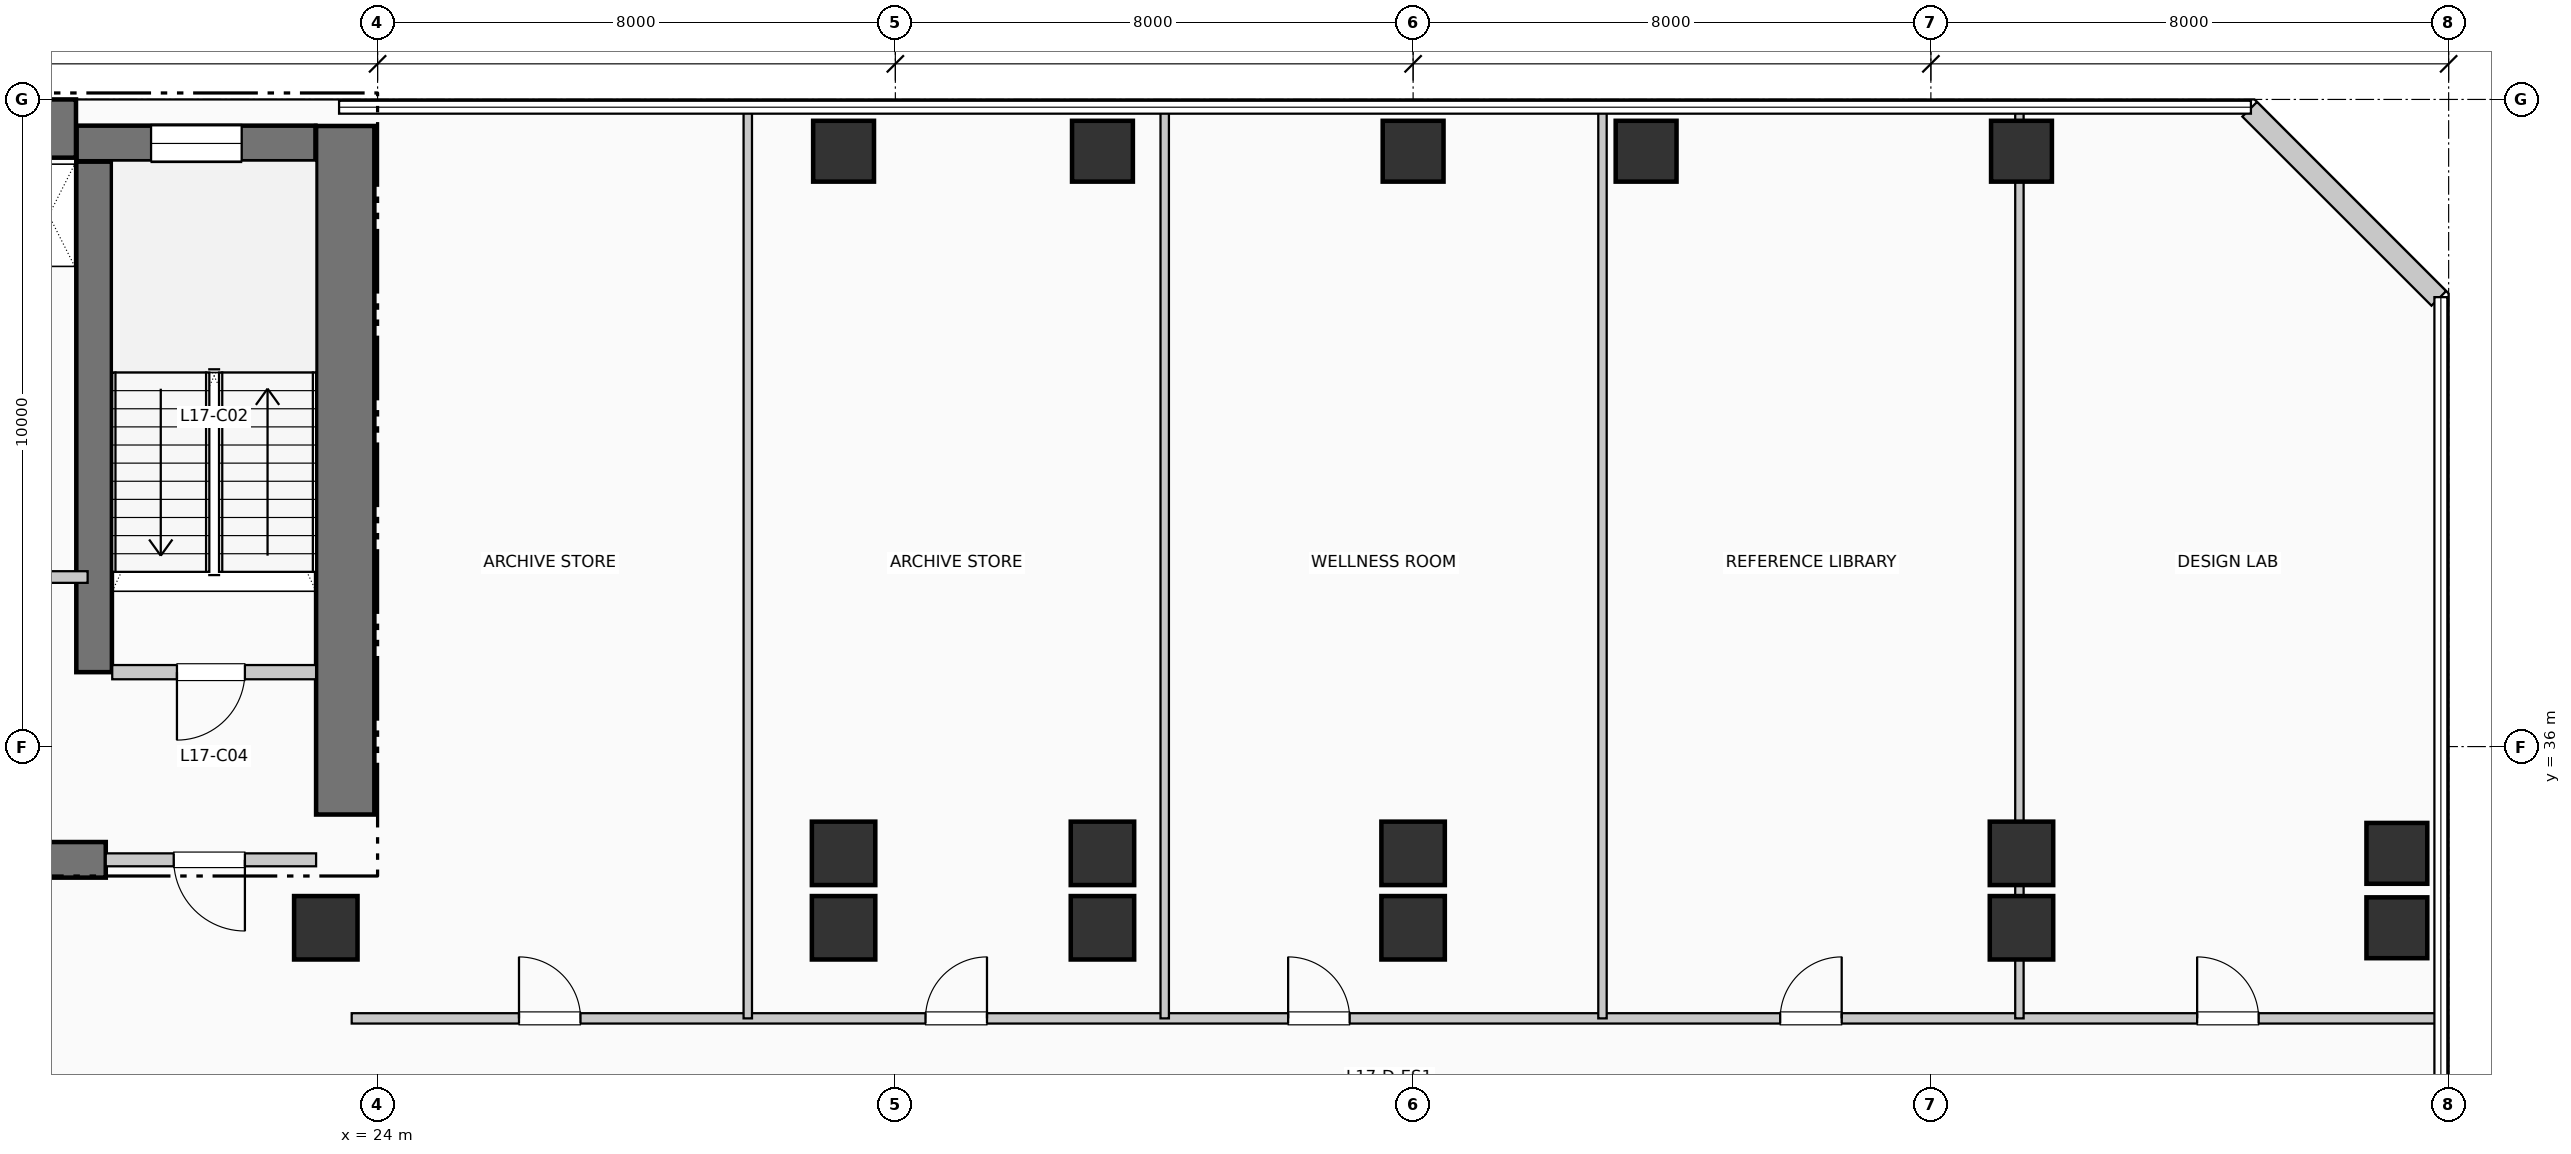
"""IFC4 building model, lengths in metres.
Left out: names, types, materials, properties, quantities, classifications, styles, units other than length and angle.
Written with IfcOpenShell. Run it as: python <this file> out.ifc"""

import sys

from ifc_helpers import new_model, si_unit, direction, frame, frame_2d, origin, origin_2d, place, context, subcontext, project, spatial, rectangle, extrude, element, fill, save


model = new_model("IFC4")
c1 = context("Model", 3, precision=1e-05, world=origin(), true_north=direction((0.0, 1.0)))
c2 = subcontext(c1, "Body", "Model", "MODEL_VIEW")
j1 = project(units=[si_unit("LENGTHUNIT", "METRE"), si_unit("PLANEANGLEUNIT", "RADIAN")], contexts=[c1])
p1 = place(None, origin())
s1 = spatial("IfcSite", under=j1, at=p1, CompositionType="ELEMENT")
p2 = place(p1, origin())
s2 = spatial("IfcBuilding", under=s1, at=p2, CompositionType="ELEMENT")
p3 = place(p2, frame((0.0, 0.0, 73.92)))
s3 = spatial("IfcBuildingStorey", under=s2, at=p3, CompositionType="ELEMENT", Elevation=73.92)
p4 = place(p3, frame((5.36, 45.55, 0.0), z_axis=(0.0, 0.0, 1.0), x_axis=(1.0, 0.0, 0.0)))
e1 = element("IfcWall", 1, at=p4, inside=s3, PredefinedType="SHEAR", context=c2, shape_type="SweptSolid", body=[
    extrude(rectangle(XDim=13.98, YDim=0.9, at=frame_2d((6.99, 0.0))), origin(), (0.0, 0.0, 1.0), 3.96),
])
p5 = place(p3, frame((23.5, 34.95, 0.0), z_axis=(0.0, 0.0, 1.0), x_axis=(0.0, 1.0, 0.0)))
e2 = element("IfcWall", 2, at=p5, inside=s3, PredefinedType="SHEAR", context=c2, shape_type="SweptSolid", body=[
    extrude(rectangle(XDim=10.64, YDim=0.9, at=frame_2d((5.32, 0.0))), origin(), (0.0, 0.0, 1.0), 3.96),
])
p6 = place(p3, frame((13.68, 34.25, 0.0), z_axis=(0.0, 0.0, 1.0), x_axis=(1.0, 0.0, 0.0)))
e3 = element("IfcWall", 3, at=p6, inside=s3, PredefinedType="SHEAR", context=c2, shape_type="SweptSolid", body=[
    extrude(rectangle(XDim=6.12, YDim=0.55, at=frame_2d((3.06, 0.0))), origin(), (0.0, 0.0, 1.0), 3.96),
])
p7 = place(p3, frame((19.62, 37.15, 0.0), z_axis=(0.0, 0.0, 1.0), x_axis=(0.0, 1.0, 0.0)))
e4 = element("IfcWall", 4, at=p7, inside=s3, PredefinedType="SHEAR", context=c2, shape_type="SweptSolid", body=[
    extrude(rectangle(XDim=7.89, YDim=0.55, at=frame_2d((3.945, 0.0))), origin(), (0.0, 0.0, 1.0), 3.96),
])
p8 = place(p3, frame((19.35, 45.32, 0.0), z_axis=(0.0, 0.0, 1.0), x_axis=(1.0, 0.0, 0.0)))
e5 = element("IfcWall", 5, at=p8, inside=s3, PredefinedType="SHEAR", context=c2, shape_type="SweptSolid", body=[
    extrude(rectangle(XDim=3.69, YDim=0.55, at=frame_2d((1.845, 0.0))), origin(), (0.0, 0.0, 1.0), 3.96),
])
p9 = place(p8, frame((1.15, 0.0, 1.05)))
e6 = element("IfcOpeningElement", 6, at=p9, cuts=e5, PredefinedType="OPENING", context=c2, shape_type="SweptSolid", body=[
    extrude(rectangle(XDim=1.4, YDim=1.8, at=frame_2d((0.7, 0.9))), frame((0.0, 0.285, 0.0), z_axis=(0.0, -1.0, 0.0), x_axis=(1.0, 0.0, 0.0)), (0.0, 0.0, 1.0), 0.57),
])
for number, where, z_axis, x_axis in (
    (7, (23.2, 33.2, 0.0), (0.0, 0.0, 1.0), (1.0, 0.0, 0.0)),
    (8, (31.2, 33.2, 0.0), (0.0, 0.0, 1.0), (1.0, 0.0, 0.0)),
    (9, (31.2, 34.35, 0.0), (0.0, 0.0, 1.0), (1.0, 0.0, 0.0)),
):
    element("IfcColumn", number, at=place(p3, frame(where, z_axis=z_axis, x_axis=x_axis)), inside=s3, PredefinedType="COLUMN", context=c2, shape_type="SweptSolid", body=[
        extrude(rectangle(XDim=0.98, YDim=0.98, at=origin_2d()), origin(), (0.0, 0.0, 1.0), 3.96),
    ])
p10 = place(p3, frame((31.2, 45.2, 0.0), z_axis=(0.0, 0.0, 1.0), x_axis=(1.0, 0.0, 0.0)))
e10 = element("IfcColumn", 10, at=p10, inside=s3, PredefinedType="COLUMN", context=c2, shape_type="SweptSolid", body=[
    extrude(rectangle(XDim=0.94, YDim=0.94, at=origin_2d()), origin(), (0.0, 0.0, 1.0), 3.96),
])
for number, where, z_axis, x_axis in (
    (11, (35.2, 33.2, 0.0), (0.0, 0.0, 1.0), (1.0, 0.0, 0.0)),
    (12, (35.2, 34.35, 0.0), (0.0, 0.0, 1.0), (1.0, 0.0, 0.0)),
):
    element("IfcColumn", number, at=place(p3, frame(where, z_axis=z_axis, x_axis=x_axis)), inside=s3, PredefinedType="COLUMN", context=c2, shape_type="SweptSolid", body=[
        extrude(rectangle(XDim=0.98, YDim=0.98, at=origin_2d()), origin(), (0.0, 0.0, 1.0), 3.96),
    ])
p11 = place(p3, frame((35.2, 45.2, 0.0), z_axis=(0.0, 0.0, 1.0), x_axis=(1.0, 0.0, 0.0)))
e13 = element("IfcColumn", 13, at=p11, inside=s3, PredefinedType="COLUMN", context=c2, shape_type="SweptSolid", body=[
    extrude(rectangle(XDim=0.94, YDim=0.94, at=origin_2d()), origin(), (0.0, 0.0, 1.0), 3.96),
])
for number, where, z_axis, x_axis in (
    (14, (40.0, 33.2, 0.0), (0.0, 0.0, 1.0), (1.0, 0.0, 0.0)),
    (15, (40.0, 34.35, 0.0), (0.0, 0.0, 1.0), (1.0, 0.0, 0.0)),
):
    element("IfcColumn", number, at=place(p3, frame(where, z_axis=z_axis, x_axis=x_axis)), inside=s3, PredefinedType="COLUMN", context=c2, shape_type="SweptSolid", body=[
        extrude(rectangle(XDim=0.98, YDim=0.98, at=origin_2d()), origin(), (0.0, 0.0, 1.0), 3.96),
    ])
for number, where, z_axis, x_axis in (
    (16, (40.0, 45.2, 0.0), (0.0, 0.0, 1.0), (1.0, 0.0, 0.0)),
    (17, (43.6, 45.2, 0.0), (0.0, 0.0, 1.0), (1.0, 0.0, 0.0)),
):
    element("IfcColumn", number, at=place(p3, frame(where, z_axis=z_axis, x_axis=x_axis)), inside=s3, PredefinedType="COLUMN", context=c2, shape_type="SweptSolid", body=[
        extrude(rectangle(XDim=0.94, YDim=0.94, at=origin_2d()), origin(), (0.0, 0.0, 1.0), 3.96),
    ])
for number, where, z_axis, x_axis in (
    (18, (49.4, 33.2, 0.0), (0.0, 0.0, 1.0), (1.0, 0.0, 0.0)),
    (19, (49.4, 34.35, 0.0), (0.0, 0.0, 1.0), (1.0, 0.0, 0.0)),
):
    element("IfcColumn", number, at=place(p3, frame(where, z_axis=z_axis, x_axis=x_axis)), inside=s3, PredefinedType="COLUMN", context=c2, shape_type="SweptSolid", body=[
        extrude(rectangle(XDim=0.98, YDim=0.98, at=origin_2d()), origin(), (0.0, 0.0, 1.0), 3.96),
    ])
for number, where, z_axis, x_axis in (
    (20, (49.4, 45.2, 0.0), (0.0, 0.0, 1.0), (1.0, 0.0, 0.0)),
    (21, (55.2, 33.2, 0.0), (0.0, 0.0, 1.0), (1.0, 0.0, 0.0)),
    (22, (55.2, 34.35, 0.0), (0.0, 0.0, 1.0), (1.0, 0.0, 0.0)),
):
    element("IfcColumn", number, at=place(p3, frame(where, z_axis=z_axis, x_axis=x_axis)), inside=s3, PredefinedType="COLUMN", context=c2, shape_type="SweptSolid", body=[
        extrude(rectangle(XDim=0.94, YDim=0.94, at=origin_2d()), origin(), (0.0, 0.0, 1.0), 3.96),
    ])
p12 = place(p3, frame((55.848, 42.926, 0.0), z_axis=(0.0, 0.0, 1.0), x_axis=(-0.707106781187, 0.707106781187, 0.0)))
e23 = element("IfcWall", 23, at=p12, inside=s3, PredefinedType="SOLIDWALL", context=c2, shape_type="SweptSolid", body=[
    extrude(rectangle(XDim=4.133, YDim=0.32, at=frame_2d((2.066, 0.0))), origin(), (0.0, 0.0, 1.0), 3.71),
])
p13 = place(p3, frame((19.9, 37.15, 0.0), z_axis=(0.0, 0.0, 1.0), x_axis=(1.0, 0.0, 0.0)))
e24 = element("IfcWall", 24, at=p13, inside=s3, PredefinedType="PARTITIONING", context=c2, shape_type="SweptSolid", body=[
    extrude(rectangle(XDim=3.15, YDim=0.22, at=frame_2d((1.575, 0.0))), origin(), (0.0, 0.0, 1.0), 3.71),
])
p14 = place(p13, frame((2.05, 0.0, 0.0), z_axis=(0.0, 0.0, 1.0), x_axis=(-1.0, 0.0, 0.0)))
e25 = element("IfcOpeningElement", 25, at=p14, cuts=e24, PredefinedType="OPENING", context=c2, shape_type="SweptSolid", body=[
    extrude(rectangle(XDim=1.05, YDim=2.15, at=frame_2d((0.525, 1.075))), frame((0.0, 0.12, 0.0), z_axis=(0.0, -1.0, 0.0), x_axis=(1.0, 0.0, 0.0)), (0.0, 0.0, 1.0), 0.24),
])
p15 = place(p3, frame((19.8, 34.25, 0.0), z_axis=(0.0, 0.0, 1.0), x_axis=(1.0, 0.0, 0.0)))
e26 = element("IfcWall", 26, at=p15, inside=s3, PredefinedType="PARTITIONING", context=c2, shape_type="SweptSolid", body=[
    extrude(rectangle(XDim=3.25, YDim=0.2, at=frame_2d((1.625, 0.0))), origin(), (0.0, 0.0, 1.0), 3.71),
])
p16 = place(p15, frame((2.15, 0.0, 0.0), z_axis=(0.0, 0.0, 1.0), x_axis=(-1.0, 0.0, 0.0)))
e27 = element("IfcOpeningElement", 27, at=p16, cuts=e26, PredefinedType="OPENING", context=c2, shape_type="SweptSolid", body=[
    extrude(rectangle(XDim=1.1, YDim=2.15, at=frame_2d((0.55, 1.075))), frame((0.0, 0.11, 0.0), z_axis=(0.0, -1.0, 0.0), x_axis=(1.0, 0.0, 0.0)), (0.0, 0.0, 1.0), 0.22),
])
p17 = place(p3, frame((17.68, 38.62, 0.0), z_axis=(0.0, 0.0, 1.0), x_axis=(1.0, 0.0, 0.0)))
e28 = element("IfcWall", 28, at=p17, inside=s3, PredefinedType="PARTITIONING", context=c2, shape_type="SweptSolid", body=[
    extrude(rectangle(XDim=1.84, YDim=0.18, at=frame_2d((0.92, 0.0))), origin(), (0.0, 0.0, 1.0), 3.71),
])
p18 = place(p17, frame((0.24, 0.0, 0.0)))
e29 = element("IfcOpeningElement", 29, at=p18, cuts=e28, PredefinedType="OPENING", context=c2, shape_type="SweptSolid", body=[
    extrude(rectangle(XDim=0.92, YDim=2.1, at=frame_2d((0.46, 1.05))), frame((0.0, 0.1, 0.0), z_axis=(0.0, -1.0, 0.0), x_axis=(1.0, 0.0, 0.0)), (0.0, 0.0, 1.0), 0.2),
])
p19 = place(p3, frame((23.6, 31.8, 0.0), z_axis=(0.0, 0.0, 1.0), x_axis=(1.0, 0.0, 0.0)))
e30 = element("IfcWall", 30, at=p19, inside=s3, PredefinedType="PARTITIONING", context=c2, shape_type="SweptSolid", body=[
    extrude(rectangle(XDim=32.21, YDim=0.16, at=frame_2d((16.105, 0.0))), origin(), (0.0, 0.0, 1.0), 3.71),
])
p20 = place(p19, frame((2.585, 0.0, 0.0)))
e31 = element("IfcOpeningElement", 31, at=p20, cuts=e30, PredefinedType="OPENING", context=c2, shape_type="SweptSolid", body=[
    extrude(rectangle(XDim=0.95, YDim=2.15, at=frame_2d((0.475, 1.075))), frame((0.0, 0.09, 0.0), z_axis=(0.0, -1.0, 0.0), x_axis=(1.0, 0.0, 0.0)), (0.0, 0.0, 1.0), 0.18),
])
p21 = place(p19, frame((8.866, 0.0, 0.0)))
e32 = element("IfcOpeningElement", 32, at=p21, cuts=e30, PredefinedType="OPENING", context=c2, shape_type="SweptSolid", body=[
    extrude(rectangle(XDim=0.95, YDim=2.15, at=frame_2d((0.475, 1.075))), frame((0.0, 0.09, 0.0), z_axis=(0.0, -1.0, 0.0), x_axis=(1.0, 0.0, 0.0)), (0.0, 0.0, 1.0), 0.18),
])
p22 = place(p19, frame((14.469, 0.0, 0.0)))
e33 = element("IfcOpeningElement", 33, at=p22, cuts=e30, PredefinedType="OPENING", context=c2, shape_type="SweptSolid", body=[
    extrude(rectangle(XDim=0.95, YDim=2.15, at=frame_2d((0.475, 1.075))), frame((0.0, 0.09, 0.0), z_axis=(0.0, -1.0, 0.0), x_axis=(1.0, 0.0, 0.0)), (0.0, 0.0, 1.0), 0.18),
])
p23 = place(p19, frame((22.072, 0.0, 0.0)))
e34 = element("IfcOpeningElement", 34, at=p23, cuts=e30, PredefinedType="OPENING", context=c2, shape_type="SweptSolid", body=[
    extrude(rectangle(XDim=0.95, YDim=2.15, at=frame_2d((0.475, 1.075))), frame((0.0, 0.09, 0.0), z_axis=(0.0, -1.0, 0.0), x_axis=(1.0, 0.0, 0.0)), (0.0, 0.0, 1.0), 0.18),
])
p24 = place(p19, frame((28.514, 0.0, 0.0)))
e35 = element("IfcOpeningElement", 35, at=p24, cuts=e30, PredefinedType="OPENING", context=c2, shape_type="SweptSolid", body=[
    extrude(rectangle(XDim=0.95, YDim=2.15, at=frame_2d((0.475, 1.075))), frame((0.0, 0.09, 0.0), z_axis=(0.0, -1.0, 0.0), x_axis=(1.0, 0.0, 0.0)), (0.0, 0.0, 1.0), 0.18),
])
for number, where, z_axis, x_axis in (
    (36, (29.72, 31.8, 0.0), (0.0, 0.0, 1.0), (0.0, 1.0, 0.0)),
    (37, (36.162, 31.8, 0.0), (0.0, 0.0, 1.0), (0.0, 1.0, 0.0)),
    (38, (42.926, 31.8, 0.0), (0.0, 0.0, 1.0), (0.0, 1.0, 0.0)),
):
    element("IfcWall", number, at=place(p3, frame(where, z_axis=z_axis, x_axis=x_axis)), inside=s3, PredefinedType="PARTITIONING", context=c2, shape_type="SweptSolid", body=[
        extrude(rectangle(XDim=14.01, YDim=0.13, at=frame_2d((7.005, 0.0))), origin(), (0.0, 0.0, 1.0), 3.71),
    ])
p25 = place(p3, frame((49.368, 31.8, 0.0), z_axis=(0.0, 0.0, 1.0), x_axis=(0.0, 1.0, 0.0)))
e39 = element("IfcWall", 39, at=p25, inside=s3, PredefinedType="PARTITIONING", context=c2, shape_type="SweptSolid", body=[
    extrude(rectangle(XDim=14.01, YDim=0.13, at=frame_2d((7.005, 0.0))), origin(), (0.0, 0.0, 1.0), 2.995),
])
p26 = place(p9, origin())
e40 = element("IfcWindow", 40, at=p26, inside=s3, PartitioningType="SINGLE_PANEL", PredefinedType="WINDOW", context=c2, shape_type="SweptSolid", body=[
    extrude(rectangle(XDim=1.4, YDim=1.8, at=frame_2d((0.7, 0.9))), frame((0.0, 0.03, 0.0), z_axis=(0.0, -1.0, 0.0), x_axis=(1.0, 0.0, 0.0)), (0.0, 0.0, 1.0), 0.06),
])
fill(e6, e40)
p27 = place(p14, origin())
e41 = element("IfcDoor", 41, at=p27, inside=s3, OperationType="SINGLE_SWING_LEFT", PredefinedType="DOOR", context=c2, shape_type="SweptSolid", body=[
    extrude(rectangle(XDim=1.05, YDim=2.15, at=frame_2d((0.525, 1.075))), frame((0.0, 0.025, 0.0), z_axis=(0.0, -1.0, 0.0), x_axis=(1.0, 0.0, 0.0)), (0.0, 0.0, 1.0), 0.05),
])
fill(e25, e41)
p28 = place(p16, origin())
e42 = element("IfcDoor", 42, at=p28, inside=s3, OperationType="SINGLE_SWING_RIGHT", PredefinedType="DOOR", context=c2, shape_type="SweptSolid", body=[
    extrude(rectangle(XDim=1.1, YDim=2.15, at=frame_2d((0.55, 1.075))), frame((0.0, 0.025, 0.0), z_axis=(0.0, -1.0, 0.0), x_axis=(1.0, 0.0, 0.0)), (0.0, 0.0, 1.0), 0.05),
])
fill(e27, e42)
p29 = place(p20, origin())
e43 = element("IfcDoor", 43, at=p29, inside=s3, OperationType="SINGLE_SWING_LEFT", PredefinedType="DOOR", context=c2, shape_type="SweptSolid", body=[
    extrude(rectangle(XDim=0.95, YDim=2.15, at=frame_2d((0.475, 1.075))), frame((0.0, 0.025, 0.0), z_axis=(0.0, -1.0, 0.0), x_axis=(1.0, 0.0, 0.0)), (0.0, 0.0, 1.0), 0.05),
])
fill(e31, e43)
p30 = place(p21, origin())
e44 = element("IfcDoor", 44, at=p30, inside=s3, OperationType="SINGLE_SWING_RIGHT", PredefinedType="DOOR", context=c2, shape_type="SweptSolid", body=[
    extrude(rectangle(XDim=0.95, YDim=2.15, at=frame_2d((0.475, 1.075))), frame((0.0, 0.025, 0.0), z_axis=(0.0, -1.0, 0.0), x_axis=(1.0, 0.0, 0.0)), (0.0, 0.0, 1.0), 0.05),
])
fill(e32, e44)
p31 = place(p22, origin())
e45 = element("IfcDoor", 45, at=p31, inside=s3, OperationType="SINGLE_SWING_LEFT", PredefinedType="DOOR", context=c2, shape_type="SweptSolid", body=[
    extrude(rectangle(XDim=0.95, YDim=2.15, at=frame_2d((0.475, 1.075))), frame((0.0, 0.025, 0.0), z_axis=(0.0, -1.0, 0.0), x_axis=(1.0, 0.0, 0.0)), (0.0, 0.0, 1.0), 0.05),
])
fill(e33, e45)
p32 = place(p23, origin())
e46 = element("IfcDoor", 46, at=p32, inside=s3, OperationType="SINGLE_SWING_RIGHT", PredefinedType="DOOR", context=c2, shape_type="SweptSolid", body=[
    extrude(rectangle(XDim=0.95, YDim=2.15, at=frame_2d((0.475, 1.075))), frame((0.0, 0.025, 0.0), z_axis=(0.0, -1.0, 0.0), x_axis=(1.0, 0.0, 0.0)), (0.0, 0.0, 1.0), 0.05),
])
fill(e34, e46)
p33 = place(p24, origin())
e47 = element("IfcDoor", 47, at=p33, inside=s3, OperationType="SINGLE_SWING_LEFT", PredefinedType="DOOR", context=c2, shape_type="SweptSolid", body=[
    extrude(rectangle(XDim=0.95, YDim=2.15, at=frame_2d((0.475, 1.075))), frame((0.0, 0.025, 0.0), z_axis=(0.0, -1.0, 0.0), x_axis=(1.0, 0.0, 0.0)), (0.0, 0.0, 1.0), 0.05),
])
fill(e35, e47)
save(model, sys.argv[1])
